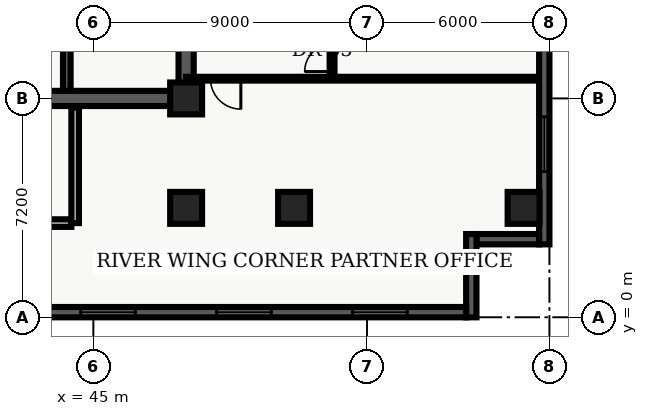
"""IFC4 building model, lengths in metres.
Left out: names, types, materials, properties, quantities, classifications, styles, units other than length and angle.
Written with IfcOpenShell. Run it as: python <this file> out.ifc"""

import sys

from ifc_helpers import new_model, entity, si_unit, converted_unit, direction, frame, origin_with_axes, origin_2d_with_axis, place, context, subcontext, project, spatial, polyline, rectangle, outline, extrude, element, fill, save


model = new_model("IFC4")
c1 = context("Model", 3, precision=1e-05, world=origin_with_axes(), true_north=direction((0.0, 1.0)))
c2 = subcontext(c1, "Body", "Model", "MODEL_VIEW")
j1 = project(units=[si_unit("LENGTHUNIT", "METRE"), converted_unit("PLANEANGLEUNIT", "DEGREE", entity("IfcPlaneAngleMeasure", 0.017), si_unit("PLANEANGLEUNIT", "RADIAN"), dimensions=[0, 0, 0, 0, 0, 0, 0])], contexts=[c1])
p1 = place(None, origin_with_axes())
s1 = spatial("IfcSite", under=j1, at=p1, CompositionType="ELEMENT")
p2 = place(p1, origin_with_axes())
s2 = spatial("IfcBuilding", under=s1, at=p2, CompositionType="ELEMENT")
p3 = place(p2, frame((0.0, 0.0, 183.6), z_axis=(0.0, 0.0, 1.0), x_axis=(1.0, 0.0, 0.0)))
s3 = spatial("IfcBuildingStorey", under=s2, at=p3, CompositionType="ELEMENT", Elevation=183.6)
p4 = place(p3, frame((40.2, 7.2, 0.0), z_axis=(0.0, 0.0, 1.0), x_axis=(1.0, 0.0, 0.0)))
e1 = element("IfcWall", 1, at=p4, inside=s3, PredefinedType="SHEAR", context=c2, shape_type="SweptSolid", body=[
    extrude(outline(polyline([(0.0, -0.25), (7.85, -0.25), (7.85, 0.25), (0.0, 0.25), (0.0, -0.25)])), origin_with_axes(), (0.0, 0.0, 1.0), 3.6),
])
p5 = place(p4, frame((2.175, 0.0, 0.0), z_axis=(0.0, 0.0, 1.0), x_axis=(1.0, 0.0, 0.0)))
e2 = element("IfcOpeningElement", 2, at=p5, cuts=e1, PredefinedType="OPENING", context=c2, shape_type="SweptSolid", body=[
    extrude(rectangle(XDim=1.05, YDim=0.52, at=origin_2d_with_axis()), origin_with_axes(), (0.0, 0.0, 1.0), 2.15),
])
p6 = place(p3, frame((48.05, 7.2, 0.0), z_axis=(0.0, 0.0, 1.0), x_axis=(0.0, 1.0, 0.0)))
e3 = element("IfcWall", 3, at=p6, inside=s3, PredefinedType="SHEAR", context=c2, shape_type="SweptSolid", body=[
    extrude(outline(polyline([(0.0, -0.25), (15.6, -0.25), (15.6, 0.25), (0.0, 0.25), (0.0, -0.25)])), origin_with_axes(), (0.0, 0.0, 1.0), 3.6),
])
p7 = place(p6, frame((5.975, 0.0, 0.0), z_axis=(0.0, 0.0, 1.0), x_axis=(1.0, 0.0, 0.0)))
e4 = element("IfcOpeningElement", 4, at=p7, cuts=e3, PredefinedType="OPENING", context=c2, shape_type="SweptSolid", body=[
    extrude(rectangle(XDim=1.05, YDim=0.52, at=origin_2d_with_axis()), origin_with_axes(), (0.0, 0.0, 1.0), 2.15),
])
p8 = place(p6, frame((2.725, 0.0, 0.0), z_axis=(0.0, 0.0, 1.0), x_axis=(1.0, 0.0, 0.0)))
e5 = element("IfcOpeningElement", 5, at=p8, cuts=e3, PredefinedType="OPENING", context=c2, shape_type="SweptSolid", body=[
    extrude(rectangle(XDim=0.95, YDim=0.52, at=origin_2d_with_axis()), origin_with_axes(), (0.0, 0.0, 1.0), 2.15),
])
p9 = place(p3, frame((44.125, 7.45, 0.0), z_axis=(0.0, 0.0, 1.0), x_axis=(0.0, 1.0, 0.0)))
e6 = element("IfcWall", 6, at=p9, inside=s3, PredefinedType="SHEAR", context=c2, shape_type="SweptSolid", body=[
    extrude(outline(polyline([(0.0, -0.125), (15.1, -0.125), (15.1, 0.125), (0.0, 0.125), (0.0, -0.125)])), origin_with_axes(), (0.0, 0.0, 1.0), 3.6),
])
p10 = place(p3, frame((40.325, 3.1, 0.0), z_axis=(0.0, 0.0, 1.0), x_axis=(1.0, 0.0, 0.0)))
e7 = element("IfcWall", 7, at=p10, inside=s3, PredefinedType="SOLIDWALL", context=c2, shape_type="SweptSolid", body=[
    extrude(outline(polyline([(0.0, -0.125), (3.95, -0.125), (3.95, 0.125), (0.0, 0.125), (0.0, -0.125)])), origin_with_axes(), (0.0, 0.0, 1.0), 2.64),
])
p11 = place(p3, frame((44.4, 3.1, 0.0), z_axis=(0.0, 0.0, 1.0), x_axis=(0.0, 1.0, 0.0)))
e8 = element("IfcWall", 8, at=p11, inside=s3, PredefinedType="SOLIDWALL", context=c2, shape_type="SweptSolid", body=[
    extrude(outline(polyline([(0.0, -0.125), (3.8, -0.125), (3.8, 0.125), (0.0, 0.125), (0.0, -0.125)])), origin_with_axes(), (0.0, 0.0, 1.0), 2.64),
])
for number, where, z_axis, x_axis in (
    (9, (48.05, 3.6, 0.0), (0.0, 0.0, 1.0), (1.0, 0.0, 0.0)),
    (10, (48.05, 7.2, 0.0), (0.0, 0.0, 1.0), (1.0, 0.0, 0.0)),
    (11, (51.6, 3.6, 0.0), (0.0, 0.0, 1.0), (1.0, 0.0, 0.0)),
    (12, (59.15, 3.6, 0.0), (0.0, 0.0, 1.0), (1.0, 0.0, 0.0)),
):
    element("IfcColumn", number, at=place(p3, frame(where, z_axis=z_axis, x_axis=x_axis)), inside=s3, PredefinedType="COLUMN", context=c2, shape_type="SweptSolid", body=[
        extrude(rectangle(XDim=1.05, YDim=1.05, at=origin_2d_with_axis()), origin_with_axes(), (0.0, 0.0, 1.0), 3.9),
    ])
p12 = place(p3, frame((52.85, 7.85, 0.0), z_axis=(0.0, 0.0, 1.0), x_axis=(0.0, 1.0, 0.0)))
e13 = element("IfcWall", 13, at=p12, inside=s3, PredefinedType="PARTITIONING", context=c2, shape_type="SweptSolid", body=[
    extrude(outline(polyline([(0.0, -0.08), (18.8, -0.08), (18.8, 0.08), (0.0, 0.08), (0.0, -0.08)])), origin_with_axes(), (0.0, 0.0, 1.0), 2.64),
])
p13 = place(p12, frame((0.684, 0.0, 0.0), z_axis=(0.0, 0.0, 1.0), x_axis=(1.0, 0.0, 0.0)))
e14 = element("IfcOpeningElement", 14, at=p13, cuts=e13, PredefinedType="OPENING", context=c2, shape_type="SweptSolid", body=[
    extrude(rectangle(XDim=0.9, YDim=0.18, at=origin_2d_with_axis()), origin_with_axes(), (0.0, 0.0, 1.0), 2.15),
])
p14 = place(p12, frame((5.907, 0.0, 0.0), z_axis=(0.0, 0.0, 1.0), x_axis=(1.0, 0.0, 0.0)))
e15 = element("IfcOpeningElement", 15, at=p14, cuts=e13, PredefinedType="OPENING", context=c2, shape_type="SweptSolid", body=[
    extrude(rectangle(XDim=1.0, YDim=0.18, at=origin_2d_with_axis()), origin_with_axes(), (0.0, 0.0, 1.0), 2.15),
])
p15 = place(p12, frame((11.368, 0.0, 0.0), z_axis=(0.0, 0.0, 1.0), x_axis=(1.0, 0.0, 0.0)))
e16 = element("IfcOpeningElement", 16, at=p15, cuts=e13, PredefinedType="OPENING", context=c2, shape_type="SweptSolid", body=[
    extrude(rectangle(XDim=1.0, YDim=0.18, at=origin_2d_with_axis()), origin_with_axes(), (0.0, 0.0, 1.0), 2.15),
])
p16 = place(p12, frame((14.204, 0.0, 0.0), z_axis=(0.0, 0.0, 1.0), x_axis=(1.0, 0.0, 0.0)))
e17 = element("IfcOpeningElement", 17, at=p16, cuts=e13, PredefinedType="OPENING", context=c2, shape_type="SweptSolid", body=[
    extrude(rectangle(XDim=1.0, YDim=0.18, at=origin_2d_with_axis()), origin_with_axes(), (0.0, 0.0, 1.0), 2.15),
])
p17 = place(p3, frame((59.665, 7.85, 0.0), z_axis=(0.0, 0.0, 1.0), x_axis=(-1.0, 0.0, 0.0)))
e18 = element("IfcWall", 18, at=p17, inside=s3, PredefinedType="PARTITIONING", context=c2, shape_type="SweptSolid", body=[
    extrude(outline(polyline([(0.0, -0.062), (11.615, -0.062), (11.615, 0.062), (0.0, 0.062), (0.0, -0.062)])), origin_with_axes(), (0.0, 0.0, 1.0), 2.64),
])
p18 = place(p17, frame((10.315, 0.0, 0.0), z_axis=(0.0, 0.0, 1.0), x_axis=(1.0, 0.0, 0.0)))
e19 = element("IfcOpeningElement", 19, at=p18, cuts=e18, PredefinedType="OPENING", context=c2, shape_type="SweptSolid", body=[
    extrude(rectangle(XDim=1.0, YDim=0.145, at=origin_2d_with_axis()), origin_with_axes(), (0.0, 0.0, 1.0), 2.15),
])
p19 = place(p3, frame((59.83, 26.06, 0.0), z_axis=(0.0, 0.0, 1.0), x_axis=(0.0, -1.0, 0.0)))
e20 = element("IfcWall", 20, at=p19, inside=s3, PredefinedType="SOLIDWALL", context=c2, shape_type="SweptSolid", body=[
    extrude(outline(polyline([(0.0, -0.17), (23.66, -0.17), (23.66, 0.17), (0.0, 0.17), (0.0, -0.17)])), origin_with_axes(), (0.0, 0.0, 1.0), 3.6),
])
p20 = place(p19, frame((3.696, 0.0, 0.45), z_axis=(0.0, 0.0, 1.0), x_axis=(1.0, 0.0, 0.0)))
e21 = element("IfcOpeningElement", 21, at=p20, cuts=e20, PredefinedType="OPENING", context=c2, shape_type="SweptSolid", body=[
    extrude(rectangle(XDim=1.8, YDim=0.36, at=origin_2d_with_axis()), origin_with_axes(), (0.0, 0.0, 1.0), 2.1),
])
p21 = place(p19, frame((11.83, 0.0, 0.45), z_axis=(0.0, 0.0, 1.0), x_axis=(1.0, 0.0, 0.0)))
e22 = element("IfcOpeningElement", 22, at=p21, cuts=e20, PredefinedType="OPENING", context=c2, shape_type="SweptSolid", body=[
    extrude(rectangle(XDim=1.8, YDim=0.36, at=origin_2d_with_axis()), origin_with_axes(), (0.0, 0.0, 1.0), 2.1),
])
p22 = place(p19, frame((20.364, 0.0, 0.45), z_axis=(0.0, 0.0, 1.0), x_axis=(1.0, 0.0, 0.0)))
e23 = element("IfcOpeningElement", 23, at=p22, cuts=e20, PredefinedType="OPENING", context=c2, shape_type="SweptSolid", body=[
    extrude(rectangle(XDim=1.8, YDim=0.36, at=origin_2d_with_axis()), origin_with_axes(), (0.0, 0.0, 1.0), 2.1),
])
p23 = place(p3, frame((59.66, 2.57, 0.0), z_axis=(0.0, 0.0, 1.0), x_axis=(-1.0, 0.0, 0.0)))
e24 = element("IfcWall", 24, at=p23, inside=s3, PredefinedType="SOLIDWALL", context=c2, shape_type="SweptSolid", body=[
    extrude(outline(polyline([(0.0, -0.17), (2.06, -0.17), (2.06, 0.17), (0.0, 0.17), (0.0, -0.17)])), origin_with_axes(), (0.0, 0.0, 1.0), 3.6),
])
p24 = place(p3, frame((57.43, 2.74, 0.0), z_axis=(0.0, 0.0, 1.0), x_axis=(0.0, -1.0, 0.0)))
e25 = element("IfcWall", 25, at=p24, inside=s3, PredefinedType="SOLIDWALL", context=c2, shape_type="SweptSolid", body=[
    extrude(outline(polyline([(0.0, -0.17), (2.74, -0.17), (2.74, 0.17), (0.0, 0.17), (0.0, -0.17)])), origin_with_axes(), (0.0, 0.0, 1.0), 3.6),
])
p25 = place(p3, frame((57.26, 0.17, 0.0), z_axis=(0.0, 0.0, 1.0), x_axis=(-1.0, 0.0, 0.0)))
e26 = element("IfcWall", 26, at=p25, inside=s3, PredefinedType="SOLIDWALL", context=c2, shape_type="SweptSolid", body=[
    extrude(outline(polyline([(0.0, -0.17), (54.86, -0.17), (54.86, 0.17), (0.0, 0.17), (0.0, -0.17)])), origin_with_axes(), (0.0, 0.0, 1.0), 3.6),
])
p26 = place(p25, frame((2.836, 0.0, 0.45), z_axis=(0.0, 0.0, 1.0), x_axis=(1.0, 0.0, 0.0)))
e27 = element("IfcOpeningElement", 27, at=p26, cuts=e26, PredefinedType="OPENING", context=c2, shape_type="SweptSolid", body=[
    extrude(rectangle(XDim=1.8, YDim=0.36, at=origin_2d_with_axis()), origin_with_axes(), (0.0, 0.0, 1.0), 2.1),
])
p27 = place(p25, frame((7.307, 0.0, 0.45), z_axis=(0.0, 0.0, 1.0), x_axis=(1.0, 0.0, 0.0)))
e28 = element("IfcOpeningElement", 28, at=p27, cuts=e26, PredefinedType="OPENING", context=c2, shape_type="SweptSolid", body=[
    extrude(rectangle(XDim=1.8, YDim=0.36, at=origin_2d_with_axis()), origin_with_axes(), (0.0, 0.0, 1.0), 2.1),
])
p28 = place(p25, frame((11.779, 0.0, 0.45), z_axis=(0.0, 0.0, 1.0), x_axis=(1.0, 0.0, 0.0)))
e29 = element("IfcOpeningElement", 29, at=p28, cuts=e26, PredefinedType="OPENING", context=c2, shape_type="SweptSolid", body=[
    extrude(rectangle(XDim=1.8, YDim=0.36, at=origin_2d_with_axis()), origin_with_axes(), (0.0, 0.0, 1.0), 2.1),
])
p29 = place(p25, frame((16.251, 0.0, 0.45), z_axis=(0.0, 0.0, 1.0), x_axis=(1.0, 0.0, 0.0)))
e30 = element("IfcOpeningElement", 30, at=p29, cuts=e26, PredefinedType="OPENING", context=c2, shape_type="SweptSolid", body=[
    extrude(rectangle(XDim=1.8, YDim=0.36, at=origin_2d_with_axis()), origin_with_axes(), (0.0, 0.0, 1.0), 2.1),
])
p30 = place(p25, frame((20.723, 0.0, 0.45), z_axis=(0.0, 0.0, 1.0), x_axis=(1.0, 0.0, 0.0)))
e31 = element("IfcOpeningElement", 31, at=p30, cuts=e26, PredefinedType="OPENING", context=c2, shape_type="SweptSolid", body=[
    extrude(rectangle(XDim=1.8, YDim=0.36, at=origin_2d_with_axis()), origin_with_axes(), (0.0, 0.0, 1.0), 2.1),
])
p31 = place(p25, frame((25.644, 0.0, 0.45), z_axis=(0.0, 0.0, 1.0), x_axis=(1.0, 0.0, 0.0)))
e32 = element("IfcOpeningElement", 32, at=p31, cuts=e26, PredefinedType="OPENING", context=c2, shape_type="SweptSolid", body=[
    extrude(rectangle(XDim=1.8, YDim=0.36, at=origin_2d_with_axis()), origin_with_axes(), (0.0, 0.0, 1.0), 2.1),
])
p32 = place(p25, frame((34.138, 0.0, 0.45), z_axis=(0.0, 0.0, 1.0), x_axis=(1.0, 0.0, 0.0)))
e33 = element("IfcOpeningElement", 33, at=p32, cuts=e26, PredefinedType="OPENING", context=c2, shape_type="SweptSolid", body=[
    extrude(rectangle(XDim=1.8, YDim=0.36, at=origin_2d_with_axis()), origin_with_axes(), (0.0, 0.0, 1.0), 2.1),
])
p33 = place(p25, frame((38.609, 0.0, 0.45), z_axis=(0.0, 0.0, 1.0), x_axis=(1.0, 0.0, 0.0)))
e34 = element("IfcOpeningElement", 34, at=p33, cuts=e26, PredefinedType="OPENING", context=c2, shape_type="SweptSolid", body=[
    extrude(rectangle(XDim=1.8, YDim=0.36, at=origin_2d_with_axis()), origin_with_axes(), (0.0, 0.0, 1.0), 2.1),
])
p34 = place(p25, frame((43.081, 0.0, 0.45), z_axis=(0.0, 0.0, 1.0), x_axis=(1.0, 0.0, 0.0)))
e35 = element("IfcOpeningElement", 35, at=p34, cuts=e26, PredefinedType="OPENING", context=c2, shape_type="SweptSolid", body=[
    extrude(rectangle(XDim=1.8, YDim=0.36, at=origin_2d_with_axis()), origin_with_axes(), (0.0, 0.0, 1.0), 2.1),
])
p35 = place(p25, frame((52.024, 0.0, 0.45), z_axis=(0.0, 0.0, 1.0), x_axis=(1.0, 0.0, 0.0)))
e36 = element("IfcOpeningElement", 36, at=p35, cuts=e26, PredefinedType="OPENING", context=c2, shape_type="SweptSolid", body=[
    extrude(rectangle(XDim=1.8, YDim=0.36, at=origin_2d_with_axis()), origin_with_axes(), (0.0, 0.0, 1.0), 2.1),
])
p36 = place(p17, frame((10.315, 0.0, 0.0), z_axis=(0.0, 0.0, 1.0), x_axis=(1.0, 0.0, 0.0)))
e37 = element("IfcDoor", 37, at=p36, inside=s3, OperationType="SINGLE_SWING_LEFT", PredefinedType="DOOR", context=c2, shape_type="SweptSolid", body=[
    extrude(rectangle(XDim=1.0, YDim=0.075, at=origin_2d_with_axis()), origin_with_axes(), (0.0, 0.0, 1.0), 2.15),
])
fill(e19, e37)
p37 = place(p12, frame((0.684, 0.0, 0.0), z_axis=(0.0, 0.0, 1.0), x_axis=(1.0, 0.0, 0.0)))
e38 = element("IfcDoor", 38, at=p37, inside=s3, OperationType="SINGLE_SWING_LEFT", PredefinedType="DOOR", context=c2, shape_type="SweptSolid", body=[
    extrude(rectangle(XDim=0.9, YDim=0.09, at=origin_2d_with_axis()), origin_with_axes(), (0.0, 0.0, 1.0), 2.15),
])
fill(e14, e38)
p38 = place(p19, frame((20.364, 0.0, 0.45), z_axis=(0.0, 0.0, 1.0), x_axis=(1.0, 0.0, 0.0)))
e39 = element("IfcWindow", 39, at=p38, inside=s3, PredefinedType="WINDOW", context=c2, shape_type="SweptSolid", body=[
    extrude(rectangle(XDim=1.8, YDim=0.09, at=origin_2d_with_axis()), origin_with_axes(), (0.0, 0.0, 1.0), 2.1),
])
fill(e23, e39)
p39 = place(p25, frame((2.836, 0.0, 0.45), z_axis=(0.0, 0.0, 1.0), x_axis=(1.0, 0.0, 0.0)))
e40 = element("IfcWindow", 40, at=p39, inside=s3, PredefinedType="WINDOW", context=c2, shape_type="SweptSolid", body=[
    extrude(rectangle(XDim=1.8, YDim=0.09, at=origin_2d_with_axis()), origin_with_axes(), (0.0, 0.0, 1.0), 2.1),
])
fill(e27, e40)
p40 = place(p25, frame((7.307, 0.0, 0.45), z_axis=(0.0, 0.0, 1.0), x_axis=(1.0, 0.0, 0.0)))
e41 = element("IfcWindow", 41, at=p40, inside=s3, PredefinedType="WINDOW", context=c2, shape_type="SweptSolid", body=[
    extrude(rectangle(XDim=1.8, YDim=0.09, at=origin_2d_with_axis()), origin_with_axes(), (0.0, 0.0, 1.0), 2.1),
])
fill(e28, e41)
p41 = place(p25, frame((11.779, 0.0, 0.45), z_axis=(0.0, 0.0, 1.0), x_axis=(1.0, 0.0, 0.0)))
e42 = element("IfcWindow", 42, at=p41, inside=s3, PredefinedType="WINDOW", context=c2, shape_type="SweptSolid", body=[
    extrude(rectangle(XDim=1.8, YDim=0.09, at=origin_2d_with_axis()), origin_with_axes(), (0.0, 0.0, 1.0), 2.1),
])
fill(e29, e42)
save(model, sys.argv[1])
